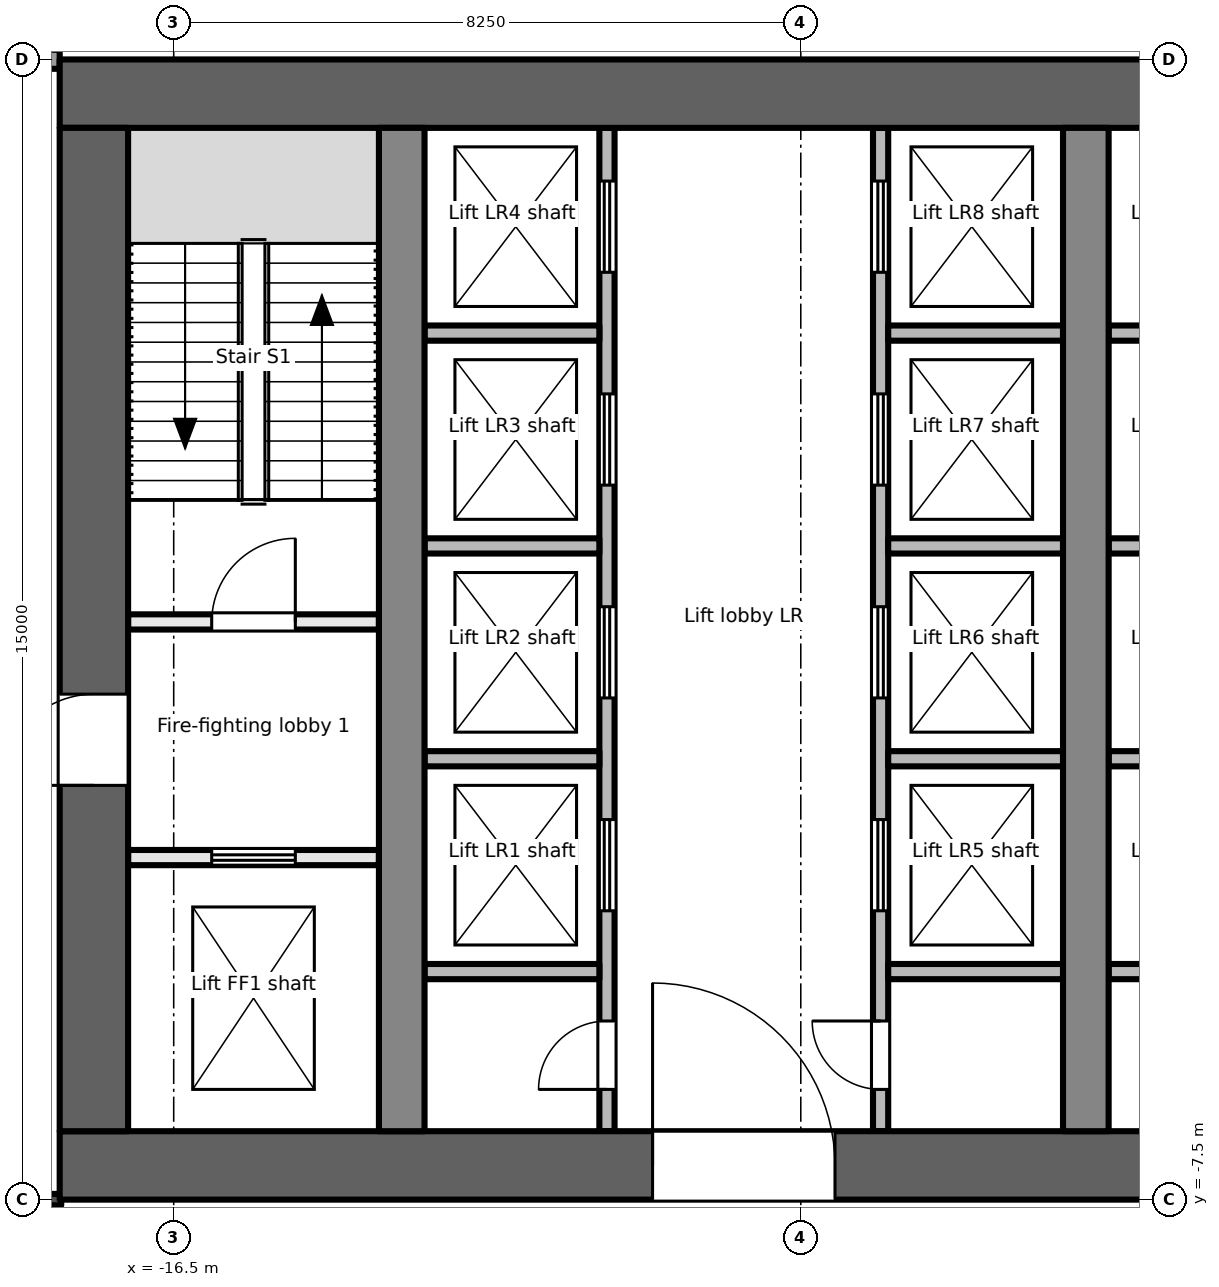
"""IFC4 building model, lengths in metres.
Left out: names, types, materials, properties, quantities, classifications, styles, units other than length and angle.
Written with IfcOpenShell. Run it as: python <this file> out.ifc"""

import sys

from ifc_helpers import new_model, si_unit, direction, frame, frame_2d, origin, place, context, subcontext, project, spatial, rectangle, extrude, element, fill, save


model = new_model("IFC4")
c1 = context("Model", 3, precision=1e-05, world=origin(), true_north=direction((0.0, 1.0)))
c2 = subcontext(c1, "Body", "Model", "MODEL_VIEW")
j1 = project(units=[si_unit("LENGTHUNIT", "METRE"), si_unit("PLANEANGLEUNIT", "RADIAN")], contexts=[c1])
p1 = place(None, origin())
s1 = spatial("IfcSite", under=j1, at=p1, CompositionType="ELEMENT")
p2 = place(p1, origin())
s2 = spatial("IfcBuilding", under=s1, at=p2, CompositionType="ELEMENT")
p3 = place(p2, frame((0.0, 0.0, 158.1)))
s3 = spatial("IfcBuildingStorey", under=s2, at=p3, CompositionType="ELEMENT", Elevation=158.1)
p4 = place(p3, frame((-18.0, -7.05, -0.2), z_axis=(0.0, 0.0, 1.0), x_axis=(1.0, 0.0, 0.0)))
e1 = element("IfcWall", 1, at=p4, inside=s3, PredefinedType="SHEAR", context=c2, shape_type="SweptSolid", body=[
    extrude(rectangle(XDim=36.0, YDim=0.9, at=frame_2d((18.0, 0.0))), origin(), (0.0, 0.0, 1.0), 5.0),
])
p5 = place(p4, frame((7.8, 0.0, 0.2)))
e2 = element("IfcOpeningElement", 2, at=p5, cuts=e1, PredefinedType="OPENING", context=c2, shape_type="SweptSolid", body=[
    extrude(rectangle(XDim=2.4, YDim=2.1, at=frame_2d((1.2, 1.05))), frame((0.0, 0.46, 0.0), z_axis=(0.0, -1.0, 0.0), x_axis=(1.0, 0.0, 0.0)), (0.0, 0.0, 1.0), 0.921),
])
p6 = place(p4, frame((17.4, 0.0, 0.2)))
e3 = element("IfcOpeningElement", 3, at=p6, cuts=e1, PredefinedType="OPENING", context=c2, shape_type="SweptSolid", body=[
    extrude(rectangle(XDim=1.2, YDim=2.1, at=frame_2d((0.6, 1.05))), frame((0.0, 0.46, 0.0), z_axis=(0.0, -1.0, 0.0), x_axis=(1.0, 0.0, 0.0)), (0.0, 0.0, 1.0), 0.921),
])
p7 = place(p4, frame((26.1, 0.0, 0.2)))
e4 = element("IfcOpeningElement", 4, at=p7, cuts=e1, PredefinedType="OPENING", context=c2, shape_type="SweptSolid", body=[
    extrude(rectangle(XDim=2.4, YDim=2.1, at=frame_2d((1.2, 1.05))), frame((0.0, 0.46, 0.0), z_axis=(0.0, -1.0, 0.0), x_axis=(1.0, 0.0, 0.0)), (0.0, 0.0, 1.0), 0.921),
])
p8 = place(p3, frame((-18.0, 7.05, -0.2), z_axis=(0.0, 0.0, 1.0), x_axis=(1.0, 0.0, 0.0)))
e5 = element("IfcWall", 5, at=p8, inside=s3, PredefinedType="SHEAR", context=c2, shape_type="SweptSolid", body=[
    extrude(rectangle(XDim=36.0, YDim=0.9, at=frame_2d((18.0, 0.0))), origin(), (0.0, 0.0, 1.0), 5.0),
])
p9 = place(p3, frame((-17.55, -6.6, -0.2), z_axis=(0.0, 0.0, 1.0), x_axis=(0.0, 1.0, 0.0)))
e6 = element("IfcWall", 6, at=p9, inside=s3, PredefinedType="SHEAR", context=c2, shape_type="SweptSolid", body=[
    extrude(rectangle(XDim=13.2, YDim=0.9, at=frame_2d((6.6, 0.0))), origin(), (0.0, 0.0, 1.0), 5.0),
])
p10 = place(p9, frame((4.55, 0.0, 0.2)))
e7 = element("IfcOpeningElement", 7, at=p10, cuts=e6, PredefinedType="OPENING", context=c2, shape_type="SweptSolid", body=[
    extrude(rectangle(XDim=1.2, YDim=2.1, at=frame_2d((0.6, 1.05))), frame((0.0, 0.46, 0.0), z_axis=(0.0, -1.0, 0.0), x_axis=(1.0, 0.0, 0.0)), (0.0, 0.0, 1.0), 0.921),
])
for number, where, z_axis, x_axis in (
    (8, (-13.5, -6.6, -0.2), (0.0, 0.0, 1.0), (0.0, 1.0, 0.0)),
    (9, (-4.5, -6.6, -0.2), (0.0, 0.0, 1.0), (0.0, 1.0, 0.0)),
):
    element("IfcWall", number, at=place(p3, frame(where, z_axis=z_axis, x_axis=x_axis)), inside=s3, PredefinedType="SHEAR", context=c2, shape_type="SweptSolid", body=[
        extrude(rectangle(XDim=13.2, YDim=0.6, at=frame_2d((6.6, 0.0))), origin(), (0.0, 0.0, 1.0), 5.0),
    ])
p11 = place(p3, frame((-17.1, -3.0, 0.0), z_axis=(0.0, 0.0, 1.0), x_axis=(1.0, 0.0, 0.0)))
e10 = element("IfcWall", 10, at=p11, inside=s3, PredefinedType="PARTITIONING", context=c2, shape_type="SweptSolid", body=[
    extrude(rectangle(XDim=3.3, YDim=0.2, at=frame_2d((1.65, 0.0))), origin(), (0.0, 0.0, 1.0), 4.8),
])
p12 = place(p11, frame((1.1, 0.0, 0.0)))
e11 = element("IfcOpeningElement", 11, at=p12, cuts=e10, PredefinedType="OPENING", context=c2, shape_type="SweptSolid", body=[
    extrude(rectangle(XDim=1.1, YDim=2.1, at=frame_2d((0.55, 1.05))), frame((0.0, 0.111, 0.0), z_axis=(0.0, -1.0, 0.0), x_axis=(1.0, 0.0, 0.0)), (0.0, 0.0, 1.0), 0.221),
])
p13 = place(p3, frame((-17.1, 0.1, 0.0), z_axis=(0.0, 0.0, 1.0), x_axis=(1.0, 0.0, 0.0)))
e12 = element("IfcWall", 12, at=p13, inside=s3, PredefinedType="PARTITIONING", context=c2, shape_type="SweptSolid", body=[
    extrude(rectangle(XDim=3.3, YDim=0.2, at=frame_2d((1.65, 0.0))), origin(), (0.0, 0.0, 1.0), 4.8),
])
p14 = place(p13, frame((1.1, 0.0, 0.0)))
e13 = element("IfcOpeningElement", 13, at=p14, cuts=e12, PredefinedType="OPENING", context=c2, shape_type="SweptSolid", body=[
    extrude(rectangle(XDim=1.1, YDim=2.1, at=frame_2d((0.55, 1.05))), frame((0.0, 0.111, 0.0), z_axis=(0.0, -1.0, 0.0), x_axis=(1.0, 0.0, 0.0)), (0.0, 0.0, 1.0), 0.221),
])
p15 = place(p3, frame((-10.8, -6.6, 0.0), z_axis=(0.0, 0.0, 1.0), x_axis=(0.0, 1.0, 0.0)))
e14 = element("IfcWall", 14, at=p15, inside=s3, PredefinedType="PARTITIONING", context=c2, shape_type="SweptSolid", body=[
    extrude(rectangle(XDim=13.2, YDim=0.2, at=frame_2d((6.6, 0.0))), origin(), (0.0, 0.0, 1.0), 4.8),
])
p16 = place(p15, frame((0.55, 0.0, 0.0)))
e15 = element("IfcOpeningElement", 15, at=p16, cuts=e14, PredefinedType="OPENING", context=c2, shape_type="SweptSolid", body=[
    extrude(rectangle(XDim=0.9, YDim=2.1, at=frame_2d((0.45, 1.05))), frame((0.0, 0.111, 0.0), z_axis=(0.0, -1.0, 0.0), x_axis=(1.0, 0.0, 0.0)), (0.0, 0.0, 1.0), 0.221),
])
p17 = place(p15, frame((2.9, 0.0, 0.0)))
e16 = element("IfcOpeningElement", 16, at=p17, cuts=e14, PredefinedType="OPENING", context=c2, shape_type="SweptSolid", body=[
    extrude(rectangle(XDim=1.2, YDim=2.1, at=frame_2d((0.6, 1.05))), frame((0.0, 0.111, 0.0), z_axis=(0.0, -1.0, 0.0), x_axis=(1.0, 0.0, 0.0)), (0.0, 0.0, 1.0), 0.221),
])
p18 = place(p15, frame((5.7, 0.0, 0.0)))
e17 = element("IfcOpeningElement", 17, at=p18, cuts=e14, PredefinedType="OPENING", context=c2, shape_type="SweptSolid", body=[
    extrude(rectangle(XDim=1.2, YDim=2.1, at=frame_2d((0.6, 1.05))), frame((0.0, 0.111, 0.0), z_axis=(0.0, -1.0, 0.0), x_axis=(1.0, 0.0, 0.0)), (0.0, 0.0, 1.0), 0.221),
])
p19 = place(p15, frame((8.5, 0.0, 0.0)))
e18 = element("IfcOpeningElement", 18, at=p19, cuts=e14, PredefinedType="OPENING", context=c2, shape_type="SweptSolid", body=[
    extrude(rectangle(XDim=1.2, YDim=2.1, at=frame_2d((0.6, 1.05))), frame((0.0, 0.111, 0.0), z_axis=(0.0, -1.0, 0.0), x_axis=(1.0, 0.0, 0.0)), (0.0, 0.0, 1.0), 0.221),
])
p20 = place(p15, frame((11.3, 0.0, 0.0)))
e19 = element("IfcOpeningElement", 19, at=p20, cuts=e14, PredefinedType="OPENING", context=c2, shape_type="SweptSolid", body=[
    extrude(rectangle(XDim=1.2, YDim=2.1, at=frame_2d((0.6, 1.05))), frame((0.0, 0.111, 0.0), z_axis=(0.0, -1.0, 0.0), x_axis=(1.0, 0.0, 0.0)), (0.0, 0.0, 1.0), 0.221),
])
p21 = place(p3, frame((-7.2, -6.6, 0.0), z_axis=(0.0, 0.0, 1.0), x_axis=(0.0, 1.0, 0.0)))
e20 = element("IfcWall", 20, at=p21, inside=s3, PredefinedType="PARTITIONING", context=c2, shape_type="SweptSolid", body=[
    extrude(rectangle(XDim=13.2, YDim=0.2, at=frame_2d((6.6, 0.0))), origin(), (0.0, 0.0, 1.0), 4.8),
])
p22 = place(p21, frame((0.55, 0.0, 0.0)))
e21 = element("IfcOpeningElement", 21, at=p22, cuts=e20, PredefinedType="OPENING", context=c2, shape_type="SweptSolid", body=[
    extrude(rectangle(XDim=0.9, YDim=2.1, at=frame_2d((0.45, 1.05))), frame((0.0, 0.111, 0.0), z_axis=(0.0, -1.0, 0.0), x_axis=(1.0, 0.0, 0.0)), (0.0, 0.0, 1.0), 0.221),
])
p23 = place(p21, frame((2.9, 0.0, 0.0)))
e22 = element("IfcOpeningElement", 22, at=p23, cuts=e20, PredefinedType="OPENING", context=c2, shape_type="SweptSolid", body=[
    extrude(rectangle(XDim=1.2, YDim=2.1, at=frame_2d((0.6, 1.05))), frame((0.0, 0.111, 0.0), z_axis=(0.0, -1.0, 0.0), x_axis=(1.0, 0.0, 0.0)), (0.0, 0.0, 1.0), 0.221),
])
p24 = place(p21, frame((5.7, 0.0, 0.0)))
e23 = element("IfcOpeningElement", 23, at=p24, cuts=e20, PredefinedType="OPENING", context=c2, shape_type="SweptSolid", body=[
    extrude(rectangle(XDim=1.2, YDim=2.1, at=frame_2d((0.6, 1.05))), frame((0.0, 0.111, 0.0), z_axis=(0.0, -1.0, 0.0), x_axis=(1.0, 0.0, 0.0)), (0.0, 0.0, 1.0), 0.221),
])
p25 = place(p21, frame((8.5, 0.0, 0.0)))
e24 = element("IfcOpeningElement", 24, at=p25, cuts=e20, PredefinedType="OPENING", context=c2, shape_type="SweptSolid", body=[
    extrude(rectangle(XDim=1.2, YDim=2.1, at=frame_2d((0.6, 1.05))), frame((0.0, 0.111, 0.0), z_axis=(0.0, -1.0, 0.0), x_axis=(1.0, 0.0, 0.0)), (0.0, 0.0, 1.0), 0.221),
])
p26 = place(p21, frame((11.3, 0.0, 0.0)))
e25 = element("IfcOpeningElement", 25, at=p26, cuts=e20, PredefinedType="OPENING", context=c2, shape_type="SweptSolid", body=[
    extrude(rectangle(XDim=1.2, YDim=2.1, at=frame_2d((0.6, 1.05))), frame((0.0, 0.111, 0.0), z_axis=(0.0, -1.0, 0.0), x_axis=(1.0, 0.0, 0.0)), (0.0, 0.0, 1.0), 0.221),
])
for number, where, z_axis, x_axis in (
    (26, (-13.2, -1.7, 0.0), (0.0, 0.0, 1.0), (1.0, 0.0, 0.0)),
    (27, (-13.2, 1.1, 0.0), (0.0, 0.0, 1.0), (1.0, 0.0, 0.0)),
    (28, (-13.2, 3.9, 0.0), (0.0, 0.0, 1.0), (1.0, 0.0, 0.0)),
    (29, (-13.2, -4.5, 0.0), (0.0, 0.0, 1.0), (1.0, 0.0, 0.0)),
    (30, (-7.1, -1.7, 0.0), (0.0, 0.0, 1.0), (1.0, 0.0, 0.0)),
    (31, (-7.1, 1.1, 0.0), (0.0, 0.0, 1.0), (1.0, 0.0, 0.0)),
    (32, (-7.1, 3.9, 0.0), (0.0, 0.0, 1.0), (1.0, 0.0, 0.0)),
    (33, (-7.1, -4.5, 0.0), (0.0, 0.0, 1.0), (1.0, 0.0, 0.0)),
    (34, (-4.2, -1.7, 0.0), (0.0, 0.0, 1.0), (1.0, 0.0, 0.0)),
    (35, (-4.2, 1.1, 0.0), (0.0, 0.0, 1.0), (1.0, 0.0, 0.0)),
    (36, (-4.2, 3.9, 0.0), (0.0, 0.0, 1.0), (1.0, 0.0, 0.0)),
    (37, (-4.2, -4.5, 0.0), (0.0, 0.0, 1.0), (1.0, 0.0, 0.0)),
):
    element("IfcWall", number, at=place(p3, frame(where, z_axis=z_axis, x_axis=x_axis)), inside=s3, PredefinedType="PARTITIONING", context=c2, shape_type="SweptSolid", body=[
        extrude(rectangle(XDim=2.3, YDim=0.2, at=frame_2d((1.15, 0.0))), origin(), (0.0, 0.0, 1.0), 4.8),
    ])
p27 = place(p3, frame((-20.3, -7.5, 0.0), z_axis=(0.0, 0.0, 1.0), x_axis=(1.0, 0.0, 0.0)))
e38 = element("IfcWall", 38, at=p27, inside=s3, PredefinedType="PARTITIONING", context=c2, shape_type="SweptSolid", body=[
    extrude(rectangle(XDim=2.32, YDim=0.15, at=frame_2d((1.16, 0.0))), origin(), (0.0, 0.0, 1.0), 4.8),
])
p28 = place(p27, frame((0.66, 0.0, 0.0)))
e39 = element("IfcOpeningElement", 39, at=p28, cuts=e38, PredefinedType="OPENING", context=c2, shape_type="SweptSolid", body=[
    extrude(rectangle(XDim=1.0, YDim=2.1, at=frame_2d((0.5, 1.05))), frame((0.0, 0.085, 0.0), z_axis=(0.0, -1.0, 0.0), x_axis=(1.0, 0.0, 0.0)), (0.0, 0.0, 1.0), 0.171),
])
p29 = place(p3, frame((-20.275, 7.502, 0.0), z_axis=(0.0, 0.0, 1.0), x_axis=(1.0, 0.0, 0.0)))
e40 = element("IfcWall", 40, at=p29, inside=s3, PredefinedType="PARTITIONING", context=c2, shape_type="SweptSolid", body=[
    extrude(rectangle(XDim=2.275, YDim=0.25, at=frame_2d((1.137, 0.0))), origin(), (0.0, 0.0, 1.0), 4.8),
])
p30 = place(p12, origin())
e41 = element("IfcDoor", 41, at=p30, inside=s3, OperationType="DOUBLE_DOOR_SLIDING", PredefinedType="DOOR", context=c2, shape_type="SweptSolid", body=[
    extrude(rectangle(XDim=1.1, YDim=2.1, at=frame_2d((0.55, 1.05))), frame((0.0, 0.025, 0.0), z_axis=(0.0, -1.0, 0.0), x_axis=(1.0, 0.0, 0.0)), (0.0, 0.0, 1.0), 0.05),
])
fill(e11, e41)
p31 = place(p10, origin())
e42 = element("IfcDoor", 42, at=p31, inside=s3, OperationType="SINGLE_SWING_LEFT", PredefinedType="DOOR", context=c2, shape_type="SweptSolid", body=[
    extrude(rectangle(XDim=1.2, YDim=2.1, at=frame_2d((0.6, 1.05))), frame((0.0, 0.025, 0.0), z_axis=(0.0, -1.0, 0.0), x_axis=(1.0, 0.0, 0.0)), (0.0, 0.0, 1.0), 0.05),
])
fill(e7, e42)
p32 = place(p14, origin())
e43 = element("IfcDoor", 43, at=p32, inside=s3, OperationType="SINGLE_SWING_RIGHT", PredefinedType="DOOR", context=c2, shape_type="SweptSolid", body=[
    extrude(rectangle(XDim=1.1, YDim=2.1, at=frame_2d((0.55, 1.05))), frame((0.0, 0.025, 0.0), z_axis=(0.0, -1.0, 0.0), x_axis=(1.0, 0.0, 0.0)), (0.0, 0.0, 1.0), 0.05),
])
fill(e13, e43)
p33 = place(p16, origin())
e44 = element("IfcDoor", 44, at=p33, inside=s3, OperationType="SINGLE_SWING_LEFT", PredefinedType="DOOR", context=c2, shape_type="SweptSolid", body=[
    extrude(rectangle(XDim=0.9, YDim=2.1, at=frame_2d((0.45, 1.05))), frame((0.0, 0.025, 0.0), z_axis=(0.0, -1.0, 0.0), x_axis=(1.0, 0.0, 0.0)), (0.0, 0.0, 1.0), 0.05),
])
fill(e15, e44)
p34 = place(p17, origin())
e45 = element("IfcDoor", 45, at=p34, inside=s3, OperationType="DOUBLE_DOOR_SLIDING", PredefinedType="DOOR", context=c2, shape_type="SweptSolid", body=[
    extrude(rectangle(XDim=1.2, YDim=2.1, at=frame_2d((0.6, 1.05))), frame((0.0, 0.025, 0.0), z_axis=(0.0, -1.0, 0.0), x_axis=(1.0, 0.0, 0.0)), (0.0, 0.0, 1.0), 0.05),
])
fill(e16, e45)
p35 = place(p18, origin())
e46 = element("IfcDoor", 46, at=p35, inside=s3, OperationType="DOUBLE_DOOR_SLIDING", PredefinedType="DOOR", context=c2, shape_type="SweptSolid", body=[
    extrude(rectangle(XDim=1.2, YDim=2.1, at=frame_2d((0.6, 1.05))), frame((0.0, 0.025, 0.0), z_axis=(0.0, -1.0, 0.0), x_axis=(1.0, 0.0, 0.0)), (0.0, 0.0, 1.0), 0.05),
])
fill(e17, e46)
p36 = place(p19, origin())
e47 = element("IfcDoor", 47, at=p36, inside=s3, OperationType="DOUBLE_DOOR_SLIDING", PredefinedType="DOOR", context=c2, shape_type="SweptSolid", body=[
    extrude(rectangle(XDim=1.2, YDim=2.1, at=frame_2d((0.6, 1.05))), frame((0.0, 0.025, 0.0), z_axis=(0.0, -1.0, 0.0), x_axis=(1.0, 0.0, 0.0)), (0.0, 0.0, 1.0), 0.05),
])
fill(e18, e47)
p37 = place(p20, origin())
e48 = element("IfcDoor", 48, at=p37, inside=s3, OperationType="DOUBLE_DOOR_SLIDING", PredefinedType="DOOR", context=c2, shape_type="SweptSolid", body=[
    extrude(rectangle(XDim=1.2, YDim=2.1, at=frame_2d((0.6, 1.05))), frame((0.0, 0.025, 0.0), z_axis=(0.0, -1.0, 0.0), x_axis=(1.0, 0.0, 0.0)), (0.0, 0.0, 1.0), 0.05),
])
fill(e19, e48)
p38 = place(p22, origin())
e49 = element("IfcDoor", 49, at=p38, inside=s3, OperationType="SINGLE_SWING_RIGHT", PredefinedType="DOOR", context=c2, shape_type="SweptSolid", body=[
    extrude(rectangle(XDim=0.9, YDim=2.1, at=frame_2d((0.45, 1.05))), frame((0.0, 0.025, 0.0), z_axis=(0.0, -1.0, 0.0), x_axis=(1.0, 0.0, 0.0)), (0.0, 0.0, 1.0), 0.05),
])
fill(e21, e49)
p39 = place(p23, origin())
e50 = element("IfcDoor", 50, at=p39, inside=s3, OperationType="DOUBLE_DOOR_SLIDING", PredefinedType="DOOR", context=c2, shape_type="SweptSolid", body=[
    extrude(rectangle(XDim=1.2, YDim=2.1, at=frame_2d((0.6, 1.05))), frame((0.0, 0.025, 0.0), z_axis=(0.0, -1.0, 0.0), x_axis=(1.0, 0.0, 0.0)), (0.0, 0.0, 1.0), 0.05),
])
fill(e22, e50)
p40 = place(p24, origin())
e51 = element("IfcDoor", 51, at=p40, inside=s3, OperationType="DOUBLE_DOOR_SLIDING", PredefinedType="DOOR", context=c2, shape_type="SweptSolid", body=[
    extrude(rectangle(XDim=1.2, YDim=2.1, at=frame_2d((0.6, 1.05))), frame((0.0, 0.025, 0.0), z_axis=(0.0, -1.0, 0.0), x_axis=(1.0, 0.0, 0.0)), (0.0, 0.0, 1.0), 0.05),
])
fill(e23, e51)
p41 = place(p25, origin())
e52 = element("IfcDoor", 52, at=p41, inside=s3, OperationType="DOUBLE_DOOR_SLIDING", PredefinedType="DOOR", context=c2, shape_type="SweptSolid", body=[
    extrude(rectangle(XDim=1.2, YDim=2.1, at=frame_2d((0.6, 1.05))), frame((0.0, 0.025, 0.0), z_axis=(0.0, -1.0, 0.0), x_axis=(1.0, 0.0, 0.0)), (0.0, 0.0, 1.0), 0.05),
])
fill(e24, e52)
p42 = place(p26, origin())
e53 = element("IfcDoor", 53, at=p42, inside=s3, OperationType="DOUBLE_DOOR_SLIDING", PredefinedType="DOOR", context=c2, shape_type="SweptSolid", body=[
    extrude(rectangle(XDim=1.2, YDim=2.1, at=frame_2d((0.6, 1.05))), frame((0.0, 0.025, 0.0), z_axis=(0.0, -1.0, 0.0), x_axis=(1.0, 0.0, 0.0)), (0.0, 0.0, 1.0), 0.05),
])
fill(e25, e53)
p43 = place(p5, origin())
e54 = element("IfcDoor", 54, at=p43, inside=s3, OperationType="DOUBLE_DOOR_DOUBLE_SWING", PredefinedType="DOOR", context=c2, shape_type="SweptSolid", body=[
    extrude(rectangle(XDim=2.4, YDim=2.1, at=frame_2d((1.2, 1.05))), frame((0.0, 0.025, 0.0), z_axis=(0.0, -1.0, 0.0), x_axis=(1.0, 0.0, 0.0)), (0.0, 0.0, 1.0), 0.05),
])
fill(e2, e54)
save(model, sys.argv[1])
